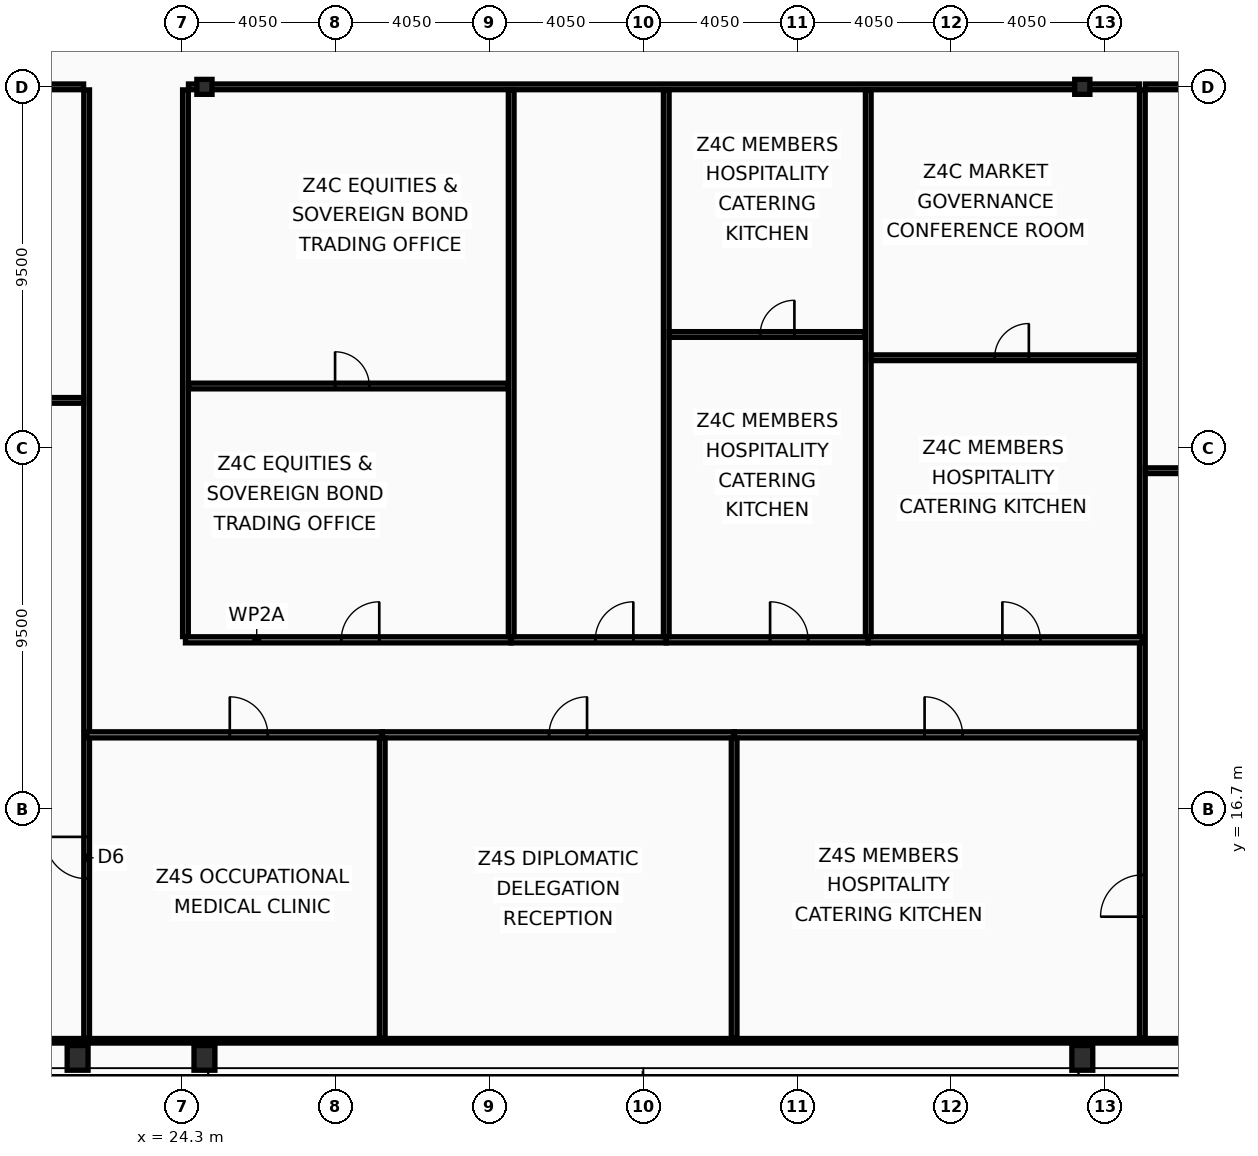
"""IFC4 building model, lengths in metres.
Left out: names, types, materials, properties, quantities, classifications, styles, units other than length and angle.
Written with IfcOpenShell. Run it as: python <this file> out.ifc"""

import sys

from ifc_helpers import new_model, si_unit, direction, frame, frame_2d, origin, origin_2d, place, context, subcontext, project, spatial, rectangle, hollow_rectangle, i_section, extrude, element, fill, save


model = new_model("IFC4")
c1 = context("Model", 3, precision=1e-05, world=origin(), true_north=direction((0.0, 1.0)))
c2 = subcontext(c1, "Body", "Model", "MODEL_VIEW")
j1 = project(units=[si_unit("LENGTHUNIT", "METRE"), si_unit("PLANEANGLEUNIT", "RADIAN")], contexts=[c1])
p1 = place(None, origin())
s1 = spatial("IfcSite", under=j1, at=p1, CompositionType="ELEMENT")
p2 = place(p1, origin())
s2 = spatial("IfcBuilding", under=s1, at=p2, CompositionType="ELEMENT")
p3 = place(p2, frame((0.0, 0.0, 325.4)))
s3 = spatial("IfcBuildingStorey", under=s2, at=p3, CompositionType="ELEMENT", Elevation=325.4)
for number, where, z_axis, x_axis in (
    (1, (21.562, 10.15, 0.0), (0.0, 0.0, 1.0), (1.0, 0.0, 0.0)),
    (2, (24.9, 10.15, 0.0), (0.0, 0.0, 1.0), (1.0, 0.0, 0.0)),
    (3, (48.0, 10.15, 0.0), (0.0, 0.0, 1.0), (1.0, 0.0, 0.0)),
):
    element("IfcColumn", number, at=place(p3, frame(where, z_axis=z_axis, x_axis=x_axis)), inside=s3, PredefinedType="COLUMN", context=c2, shape_type="SweptSolid", body=[
        extrude(hollow_rectangle(XDim=0.55, YDim=0.65, WallThickness=0.04, at=origin_2d()), origin(), (0.0, 0.0, 1.0), 3.6),
    ])
for number, where, z_axis, x_axis in (
    (4, (24.9, 35.7, 0.0), (0.0, 0.0, 1.0), (1.0, 0.0, 0.0)),
    (5, (48.0, 35.7, 0.0), (0.0, 0.0, 1.0), (1.0, 0.0, 0.0)),
):
    element("IfcColumn", number, at=place(p3, frame(where, z_axis=z_axis, x_axis=x_axis)), inside=s3, PredefinedType="COLUMN", context=c2, shape_type="SweptSolid", body=[
        extrude(i_section(OverallWidth=0.399, OverallDepth=0.393, WebThickness=0.023, FlangeThickness=0.037, at=origin_2d()), origin(), (0.0, 0.0, 1.0), 3.6),
    ])
p4 = place(p3, frame((21.8, 10.665, 0.0), z_axis=(0.0, 0.0, 1.0), x_axis=(0.0, 1.0, 0.0)))
e6 = element("IfcWall", 6, at=p4, inside=s3, PredefinedType="PARTITIONING", context=c2, shape_type="SweptSolid", body=[
    extrude(rectangle(XDim=24.955, YDim=0.15, at=frame_2d((12.478, 0.0))), origin(), (0.0, 0.0, 1.0), 3.07),
])
p5 = place(p4, frame((4.2, 0.0, 0.0)))
e7 = element("IfcOpeningElement", 7, at=p5, cuts=e6, PredefinedType="OPENING", context=c2, shape_type="SweptSolid", body=[
    extrude(rectangle(XDim=1.1, YDim=2.1, at=frame_2d((0.55, 1.05))), frame((0.0, 0.085, 0.0), z_axis=(0.0, -1.0, 0.0), x_axis=(1.0, 0.0, 0.0)), (0.0, 0.0, 1.0), 0.17),
])
p6 = place(p3, frame((12.095, 35.7, 0.0), z_axis=(0.0, 0.0, 1.0), x_axis=(1.0, 0.0, 0.0)))
e8 = element("IfcWall", 8, at=p6, inside=s3, PredefinedType="PARTITIONING", context=c2, shape_type="SweptSolid", body=[
    extrude(rectangle(XDim=9.625, YDim=0.15, at=frame_2d((4.812, 0.0))), origin(), (0.0, 0.0, 1.0), 2.83),
])
p7 = place(p6, frame((2.8, 0.0, 0.0)))
e9 = element("IfcOpeningElement", 9, at=p7, cuts=e8, PredefinedType="OPENING", context=c2, shape_type="SweptSolid", body=[
    extrude(rectangle(XDim=1.0, YDim=2.05, at=frame_2d((0.5, 1.025))), frame((0.0, 0.085, 0.0), z_axis=(0.0, -1.0, 0.0), x_axis=(1.0, 0.0, 0.0)), (0.0, 0.0, 1.0), 0.17),
])
p8 = place(p3, frame((12.095, 27.45, 0.0), z_axis=(0.0, 0.0, 1.0), x_axis=(1.0, 0.0, 0.0)))
e10 = element("IfcWall", 10, at=p8, inside=s3, PredefinedType="PARTITIONING", context=c2, shape_type="SweptSolid", body=[
    extrude(rectangle(XDim=9.625, YDim=0.15, at=frame_2d((4.812, 0.0))), origin(), (0.0, 0.0, 1.0), 2.83),
])
p9 = place(p8, frame((2.2, 0.0, 0.0)))
e11 = element("IfcOpeningElement", 11, at=p9, cuts=e10, PredefinedType="OPENING", context=c2, shape_type="SweptSolid", body=[
    extrude(rectangle(XDim=0.9, YDim=2.05, at=frame_2d((0.45, 1.025))), frame((0.0, 0.085, 0.0), z_axis=(0.0, -1.0, 0.0), x_axis=(1.0, 0.0, 0.0)), (0.0, 0.0, 1.0), 0.17),
])
p10 = place(p3, frame((24.4, 21.235, 0.0), z_axis=(0.0, 0.0, 1.0), x_axis=(0.0, 1.0, 0.0)))
e12 = element("IfcWall", 12, at=p10, inside=s3, PredefinedType="PARTITIONING", context=c2, shape_type="SweptSolid", body=[
    extrude(rectangle(XDim=14.385, YDim=0.15, at=frame_2d((7.192, 0.0))), origin(), (0.0, 0.0, 1.0), 2.83),
])
p11 = place(p3, frame((49.58, 10.665, 0.0), z_axis=(0.0, 0.0, 1.0), x_axis=(0.0, 1.0, 0.0)))
e13 = element("IfcWall", 13, at=p11, inside=s3, PredefinedType="PARTITIONING", context=c2, shape_type="SweptSolid", body=[
    extrude(rectangle(XDim=24.955, YDim=0.15, at=frame_2d((12.478, 0.0))), origin(), (0.0, 0.0, 1.0), 3.07),
])
p12 = place(p11, frame((3.2, 0.0, 0.0)))
e14 = element("IfcOpeningElement", 14, at=p12, cuts=e13, PredefinedType="OPENING", context=c2, shape_type="SweptSolid", body=[
    extrude(rectangle(XDim=1.1, YDim=2.1, at=frame_2d((0.55, 1.05))), frame((0.0, 0.085, 0.0), z_axis=(0.0, -1.0, 0.0), x_axis=(1.0, 0.0, 0.0)), (0.0, 0.0, 1.0), 0.17),
])
p13 = place(p3, frame((24.48, 35.7, 0.0), z_axis=(0.0, 0.0, 1.0), x_axis=(1.0, 0.0, 0.0)))
e15 = element("IfcWall", 15, at=p13, inside=s3, PredefinedType="PARTITIONING", context=c2, shape_type="SweptSolid", body=[
    extrude(rectangle(XDim=25.02, YDim=0.15, at=frame_2d((12.51, 0.0))), origin(), (0.0, 0.0, 1.0), 2.83),
])
p14 = place(p3, frame((49.66, 35.7, 0.0), z_axis=(0.0, 0.0, 1.0), x_axis=(1.0, 0.0, 0.0)))
e16 = element("IfcWall", 16, at=p14, inside=s3, PredefinedType="PARTITIONING", context=c2, shape_type="SweptSolid", body=[
    extrude(rectangle(XDim=11.145, YDim=0.15, at=frame_2d((5.573, 0.0))), origin(), (0.0, 0.0, 1.0), 2.83),
])
p15 = place(p14, frame((2.2, 0.0, 0.0)))
e17 = element("IfcOpeningElement", 17, at=p15, cuts=e16, PredefinedType="OPENING", context=c2, shape_type="SweptSolid", body=[
    extrude(rectangle(XDim=1.0, YDim=2.05, at=frame_2d((0.5, 1.025))), frame((0.0, 0.085, 0.0), z_axis=(0.0, -1.0, 0.0), x_axis=(1.0, 0.0, 0.0)), (0.0, 0.0, 1.0), 0.17),
])
p16 = place(p3, frame((49.66, 25.6, 0.0), z_axis=(0.0, 0.0, 1.0), x_axis=(1.0, 0.0, 0.0)))
e18 = element("IfcWall", 18, at=p16, inside=s3, PredefinedType="PARTITIONING", context=c2, shape_type="SweptSolid", body=[
    extrude(rectangle(XDim=11.145, YDim=0.15, at=frame_2d((5.573, 0.0))), origin(), (0.0, 0.0, 1.0), 2.83),
])
p17 = place(p16, frame((2.2, 0.0, 0.0)))
e19 = element("IfcOpeningElement", 19, at=p17, cuts=e18, PredefinedType="OPENING", context=c2, shape_type="SweptSolid", body=[
    extrude(rectangle(XDim=0.9, YDim=2.05, at=frame_2d((0.45, 1.025))), frame((0.0, 0.085, 0.0), z_axis=(0.0, -1.0, 0.0), x_axis=(1.0, 0.0, 0.0)), (0.0, 0.0, 1.0), 0.17),
])
p18 = place(p3, frame((24.4, 21.15, 0.0), z_axis=(0.0, 0.0, 1.0), x_axis=(1.0, 0.0, 0.0)))
e20 = element("IfcWall", 20, at=p18, inside=s3, PredefinedType="PARTITIONING", context=c2, shape_type="SweptSolid", body=[
    extrude(rectangle(XDim=8.572, YDim=0.16, at=frame_2d((4.286, 0.0))), origin(), (0.0, 0.0, 1.0), 2.83),
])
p19 = place(p18, frame((4.1, 0.0, 0.0)))
e21 = element("IfcOpeningElement", 21, at=p19, cuts=e20, PredefinedType="OPENING", context=c2, shape_type="SweptSolid", body=[
    extrude(rectangle(XDim=1.0, YDim=2.05, at=frame_2d((0.5, 1.025))), frame((0.0, 0.09, 0.0), z_axis=(0.0, -1.0, 0.0), x_axis=(1.0, 0.0, 0.0)), (0.0, 0.0, 1.0), 0.18),
])
p20 = place(p3, frame((24.48, 27.829, 0.0), z_axis=(0.0, 0.0, 1.0), x_axis=(1.0, 0.0, 0.0)))
e22 = element("IfcWall", 22, at=p20, inside=s3, PredefinedType="PARTITIONING", context=c2, shape_type="SweptSolid", body=[
    extrude(rectangle(XDim=8.412, YDim=0.15, at=frame_2d((4.206, 0.0))), origin(), (0.0, 0.0, 1.0), 2.83),
])
p21 = place(p20, frame((3.857, 0.0, 0.0)))
e23 = element("IfcOpeningElement", 23, at=p21, cuts=e22, PredefinedType="OPENING", context=c2, shape_type="SweptSolid", body=[
    extrude(rectangle(XDim=0.9, YDim=2.05, at=frame_2d((0.45, 1.025))), frame((0.0, 0.085, 0.0), z_axis=(0.0, -1.0, 0.0), x_axis=(1.0, 0.0, 0.0)), (0.0, 0.0, 1.0), 0.17),
])
p22 = place(p3, frame((32.972, 21.15, 0.0), z_axis=(0.0, 0.0, 1.0), x_axis=(1.0, 0.0, 0.0)))
e24 = element("IfcWall", 24, at=p22, inside=s3, PredefinedType="PARTITIONING", context=c2, shape_type="SweptSolid", body=[
    extrude(rectangle(XDim=4.08, YDim=0.16, at=frame_2d((2.04, 0.0))), origin(), (0.0, 0.0, 1.0), 3.44),
])
p23 = place(p22, frame((2.214, 0.0, 0.0)))
e25 = element("IfcOpeningElement", 25, at=p23, cuts=e24, PredefinedType="OPENING", context=c2, shape_type="SweptSolid", body=[
    extrude(rectangle(XDim=1.0, YDim=2.05, at=frame_2d((0.5, 1.025))), frame((0.0, 0.09, 0.0), z_axis=(0.0, -1.0, 0.0), x_axis=(1.0, 0.0, 0.0)), (0.0, 0.0, 1.0), 0.18),
])
p24 = place(p3, frame((32.972, 21.235, 0.0), z_axis=(0.0, 0.0, 1.0), x_axis=(0.0, 1.0, 0.0)))
e26 = element("IfcWall", 26, at=p24, inside=s3, PredefinedType="PARTITIONING", context=c2, shape_type="SweptSolid", body=[
    extrude(rectangle(XDim=14.385, YDim=0.15, at=frame_2d((7.192, 0.0))), origin(), (0.0, 0.0, 1.0), 3.07),
])
p25 = place(p3, frame((37.052, 21.15, 0.0), z_axis=(0.0, 0.0, 1.0), x_axis=(1.0, 0.0, 0.0)))
e27 = element("IfcWall", 27, at=p25, inside=s3, PredefinedType="PARTITIONING", context=c2, shape_type="SweptSolid", body=[
    extrude(rectangle(XDim=5.316, YDim=0.16, at=frame_2d((2.658, 0.0))), origin(), (0.0, 0.0, 1.0), 3.44),
])
p26 = place(p25, frame((2.733, 0.0, 0.0)))
e28 = element("IfcOpeningElement", 28, at=p26, cuts=e27, PredefinedType="OPENING", context=c2, shape_type="SweptSolid", body=[
    extrude(rectangle(XDim=1.0, YDim=2.05, at=frame_2d((0.5, 1.025))), frame((0.0, 0.09, 0.0), z_axis=(0.0, -1.0, 0.0), x_axis=(1.0, 0.0, 0.0)), (0.0, 0.0, 1.0), 0.18),
])
p27 = place(p3, frame((37.052, 21.235, 0.0), z_axis=(0.0, 0.0, 1.0), x_axis=(0.0, 1.0, 0.0)))
e29 = element("IfcWall", 29, at=p27, inside=s3, PredefinedType="PARTITIONING", context=c2, shape_type="SweptSolid", body=[
    extrude(rectangle(XDim=14.385, YDim=0.15, at=frame_2d((7.192, 0.0))), origin(), (0.0, 0.0, 1.0), 3.07),
])
p28 = place(p3, frame((37.132, 29.184, 0.0), z_axis=(0.0, 0.0, 1.0), x_axis=(1.0, 0.0, 0.0)))
e30 = element("IfcWall", 30, at=p28, inside=s3, PredefinedType="PARTITIONING", context=c2, shape_type="SweptSolid", body=[
    extrude(rectangle(XDim=5.156, YDim=0.15, at=frame_2d((2.578, 0.0))), origin(), (0.0, 0.0, 1.0), 3.07),
])
p29 = place(p28, frame((2.392, 0.0, 0.0)))
e31 = element("IfcOpeningElement", 31, at=p29, cuts=e30, PredefinedType="OPENING", context=c2, shape_type="SweptSolid", body=[
    extrude(rectangle(XDim=0.9, YDim=2.05, at=frame_2d((0.45, 1.025))), frame((0.0, 0.085, 0.0), z_axis=(0.0, -1.0, 0.0), x_axis=(1.0, 0.0, 0.0)), (0.0, 0.0, 1.0), 0.17),
])
p30 = place(p3, frame((42.368, 21.15, 0.0), z_axis=(0.0, 0.0, 1.0), x_axis=(1.0, 0.0, 0.0)))
e32 = element("IfcWall", 32, at=p30, inside=s3, PredefinedType="PARTITIONING", context=c2, shape_type="SweptSolid", body=[
    extrude(rectangle(XDim=7.212, YDim=0.16, at=frame_2d((3.606, 0.0))), origin(), (0.0, 0.0, 1.0), 2.83),
])
p31 = place(p30, frame((3.529, 0.0, 0.0)))
e33 = element("IfcOpeningElement", 33, at=p31, cuts=e32, PredefinedType="OPENING", context=c2, shape_type="SweptSolid", body=[
    extrude(rectangle(XDim=1.0, YDim=2.05, at=frame_2d((0.5, 1.025))), frame((0.0, 0.09, 0.0), z_axis=(0.0, -1.0, 0.0), x_axis=(1.0, 0.0, 0.0)), (0.0, 0.0, 1.0), 0.18),
])
p32 = place(p3, frame((42.368, 21.235, 0.0), z_axis=(0.0, 0.0, 1.0), x_axis=(0.0, 1.0, 0.0)))
e34 = element("IfcWall", 34, at=p32, inside=s3, PredefinedType="PARTITIONING", context=c2, shape_type="SweptSolid", body=[
    extrude(rectangle(XDim=14.385, YDim=0.15, at=frame_2d((7.192, 0.0))), origin(), (0.0, 0.0, 1.0), 3.07),
])
p33 = place(p3, frame((42.448, 28.572, 0.0), z_axis=(0.0, 0.0, 1.0), x_axis=(1.0, 0.0, 0.0)))
e35 = element("IfcWall", 35, at=p33, inside=s3, PredefinedType="PARTITIONING", context=c2, shape_type="SweptSolid", body=[
    extrude(rectangle(XDim=7.052, YDim=0.15, at=frame_2d((3.526, 0.0))), origin(), (0.0, 0.0, 1.0), 2.83),
])
p34 = place(p33, frame((3.245, 0.0, 0.0)))
e36 = element("IfcOpeningElement", 36, at=p34, cuts=e35, PredefinedType="OPENING", context=c2, shape_type="SweptSolid", body=[
    extrude(rectangle(XDim=0.9, YDim=2.05, at=frame_2d((0.45, 1.025))), frame((0.0, 0.085, 0.0), z_axis=(0.0, -1.0, 0.0), x_axis=(1.0, 0.0, 0.0)), (0.0, 0.0, 1.0), 0.17),
])
p35 = place(p3, frame((21.8, 18.65, 0.0), z_axis=(0.0, 0.0, 1.0), x_axis=(1.0, 0.0, 0.0)))
e37 = element("IfcWall", 37, at=p35, inside=s3, PredefinedType="PARTITIONING", context=c2, shape_type="SweptSolid", body=[
    extrude(rectangle(XDim=7.778, YDim=0.16, at=frame_2d((3.889, 0.0))), origin(), (0.0, 0.0, 1.0), 2.83),
])
p36 = place(p35, frame((3.767, 0.0, 0.0)))
e38 = element("IfcOpeningElement", 38, at=p36, cuts=e37, PredefinedType="OPENING", context=c2, shape_type="SweptSolid", body=[
    extrude(rectangle(XDim=1.0, YDim=2.05, at=frame_2d((0.5, 1.025))), frame((0.0, 0.09, 0.0), z_axis=(0.0, -1.0, 0.0), x_axis=(1.0, 0.0, 0.0)), (0.0, 0.0, 1.0), 0.18),
])
p37 = place(p3, frame((29.578, 18.65, 0.0), z_axis=(0.0, 0.0, 1.0), x_axis=(1.0, 0.0, 0.0)))
e39 = element("IfcWall", 39, at=p37, inside=s3, PredefinedType="PARTITIONING", context=c2, shape_type="SweptSolid", body=[
    extrude(rectangle(XDim=9.26, YDim=0.16, at=frame_2d((4.63, 0.0))), origin(), (0.0, 0.0, 1.0), 3.44),
])
p38 = place(p37, frame((4.389, 0.0, 0.0)))
e40 = element("IfcOpeningElement", 40, at=p38, cuts=e39, PredefinedType="OPENING", context=c2, shape_type="SweptSolid", body=[
    extrude(rectangle(XDim=1.0, YDim=2.05, at=frame_2d((0.5, 1.025))), frame((0.0, 0.09, 0.0), z_axis=(0.0, -1.0, 0.0), x_axis=(1.0, 0.0, 0.0)), (0.0, 0.0, 1.0), 0.18),
])
p39 = place(p3, frame((29.578, 10.665, 0.0), z_axis=(0.0, 0.0, 1.0), x_axis=(0.0, 1.0, 0.0)))
e41 = element("IfcWall", 41, at=p39, inside=s3, PredefinedType="PARTITIONING", context=c2, shape_type="SweptSolid", body=[
    extrude(rectangle(XDim=7.9, YDim=0.15, at=frame_2d((3.95, 0.0))), origin(), (0.0, 0.0, 1.0), 3.07),
])
p40 = place(p3, frame((38.838, 18.65, 0.0), z_axis=(0.0, 0.0, 1.0), x_axis=(1.0, 0.0, 0.0)))
e42 = element("IfcWall", 42, at=p40, inside=s3, PredefinedType="PARTITIONING", context=c2, shape_type="SweptSolid", body=[
    extrude(rectangle(XDim=10.742, YDim=0.16, at=frame_2d((5.371, 0.0))), origin(), (0.0, 0.0, 1.0), 2.83),
])
p41 = place(p40, frame((5.011, 0.0, 0.0)))
e43 = element("IfcOpeningElement", 43, at=p41, cuts=e42, PredefinedType="OPENING", context=c2, shape_type="SweptSolid", body=[
    extrude(rectangle(XDim=1.0, YDim=2.05, at=frame_2d((0.5, 1.025))), frame((0.0, 0.09, 0.0), z_axis=(0.0, -1.0, 0.0), x_axis=(1.0, 0.0, 0.0)), (0.0, 0.0, 1.0), 0.18),
])
p42 = place(p3, frame((38.838, 10.665, 0.0), z_axis=(0.0, 0.0, 1.0), x_axis=(0.0, 1.0, 0.0)))
e44 = element("IfcWall", 44, at=p42, inside=s3, PredefinedType="PARTITIONING", context=c2, shape_type="SweptSolid", body=[
    extrude(rectangle(XDim=7.9, YDim=0.15, at=frame_2d((3.95, 0.0))), origin(), (0.0, 0.0, 1.0), 3.07),
])
p43 = place(p3, frame((12.095, 10.6, 0.0), z_axis=(0.0, 0.0, 1.0), x_axis=(1.0, 0.0, 0.0)))
e45 = element("IfcWall", 45, at=p43, inside=s3, PredefinedType="PARTITIONING", context=c2, shape_type="SweptSolid", body=[
    extrude(rectangle(XDim=48.71, YDim=0.12, at=frame_2d((24.355, 0.0))), origin(), (0.0, 0.0, 1.0), 2.83),
])
p44 = place(p5, origin())
e46 = element("IfcDoor", 46, at=p44, inside=s3, OperationType="SINGLE_SWING_RIGHT", PredefinedType="DOOR", context=c2, shape_type="SweptSolid", body=[
    extrude(rectangle(XDim=1.1, YDim=2.1, at=frame_2d((0.55, 1.05))), frame((0.0, 0.025, 0.0), z_axis=(0.0, -1.0, 0.0), x_axis=(1.0, 0.0, 0.0)), (0.0, 0.0, 1.0), 0.05),
])
fill(e7, e46)
p45 = place(p12, origin())
e47 = element("IfcDoor", 47, at=p45, inside=s3, OperationType="SINGLE_SWING_LEFT", PredefinedType="DOOR", context=c2, shape_type="SweptSolid", body=[
    extrude(rectangle(XDim=1.1, YDim=2.1, at=frame_2d((0.55, 1.05))), frame((0.0, 0.025, 0.0), z_axis=(0.0, -1.0, 0.0), x_axis=(1.0, 0.0, 0.0)), (0.0, 0.0, 1.0), 0.05),
])
fill(e14, e47)
p46 = place(p19, origin())
e48 = element("IfcDoor", 48, at=p46, inside=s3, OperationType="SINGLE_SWING_RIGHT", PredefinedType="DOOR", context=c2, shape_type="SweptSolid", body=[
    extrude(rectangle(XDim=1.0, YDim=2.05, at=frame_2d((0.5, 1.025))), frame((0.0, 0.025, 0.0), z_axis=(0.0, -1.0, 0.0), x_axis=(1.0, 0.0, 0.0)), (0.0, 0.0, 1.0), 0.05),
])
fill(e21, e48)
p47 = place(p21, origin())
e49 = element("IfcDoor", 49, at=p47, inside=s3, OperationType="SINGLE_SWING_LEFT", PredefinedType="DOOR", context=c2, shape_type="SweptSolid", body=[
    extrude(rectangle(XDim=0.9, YDim=2.05, at=frame_2d((0.45, 1.025))), frame((0.0, 0.025, 0.0), z_axis=(0.0, -1.0, 0.0), x_axis=(1.0, 0.0, 0.0)), (0.0, 0.0, 1.0), 0.05),
])
fill(e23, e49)
p48 = place(p23, origin())
e50 = element("IfcDoor", 50, at=p48, inside=s3, OperationType="SINGLE_SWING_RIGHT", PredefinedType="DOOR", context=c2, shape_type="SweptSolid", body=[
    extrude(rectangle(XDim=1.0, YDim=2.05, at=frame_2d((0.5, 1.025))), frame((0.0, 0.025, 0.0), z_axis=(0.0, -1.0, 0.0), x_axis=(1.0, 0.0, 0.0)), (0.0, 0.0, 1.0), 0.05),
])
fill(e25, e50)
p49 = place(p26, origin())
e51 = element("IfcDoor", 51, at=p49, inside=s3, OperationType="SINGLE_SWING_LEFT", PredefinedType="DOOR", context=c2, shape_type="SweptSolid", body=[
    extrude(rectangle(XDim=1.0, YDim=2.05, at=frame_2d((0.5, 1.025))), frame((0.0, 0.025, 0.0), z_axis=(0.0, -1.0, 0.0), x_axis=(1.0, 0.0, 0.0)), (0.0, 0.0, 1.0), 0.05),
])
fill(e28, e51)
p50 = place(p29, origin())
e52 = element("IfcDoor", 52, at=p50, inside=s3, OperationType="SINGLE_SWING_RIGHT", PredefinedType="DOOR", context=c2, shape_type="SweptSolid", body=[
    extrude(rectangle(XDim=0.9, YDim=2.05, at=frame_2d((0.45, 1.025))), frame((0.0, 0.025, 0.0), z_axis=(0.0, -1.0, 0.0), x_axis=(1.0, 0.0, 0.0)), (0.0, 0.0, 1.0), 0.05),
])
fill(e31, e52)
p51 = place(p31, origin())
e53 = element("IfcDoor", 53, at=p51, inside=s3, OperationType="SINGLE_SWING_LEFT", PredefinedType="DOOR", context=c2, shape_type="SweptSolid", body=[
    extrude(rectangle(XDim=1.0, YDim=2.05, at=frame_2d((0.5, 1.025))), frame((0.0, 0.025, 0.0), z_axis=(0.0, -1.0, 0.0), x_axis=(1.0, 0.0, 0.0)), (0.0, 0.0, 1.0), 0.05),
])
fill(e33, e53)
p52 = place(p34, origin())
e54 = element("IfcDoor", 54, at=p52, inside=s3, OperationType="SINGLE_SWING_RIGHT", PredefinedType="DOOR", context=c2, shape_type="SweptSolid", body=[
    extrude(rectangle(XDim=0.9, YDim=2.05, at=frame_2d((0.45, 1.025))), frame((0.0, 0.025, 0.0), z_axis=(0.0, -1.0, 0.0), x_axis=(1.0, 0.0, 0.0)), (0.0, 0.0, 1.0), 0.05),
])
fill(e36, e54)
p53 = place(p36, origin())
e55 = element("IfcDoor", 55, at=p53, inside=s3, OperationType="SINGLE_SWING_LEFT", PredefinedType="DOOR", context=c2, shape_type="SweptSolid", body=[
    extrude(rectangle(XDim=1.0, YDim=2.05, at=frame_2d((0.5, 1.025))), frame((0.0, 0.025, 0.0), z_axis=(0.0, -1.0, 0.0), x_axis=(1.0, 0.0, 0.0)), (0.0, 0.0, 1.0), 0.05),
])
fill(e38, e55)
p54 = place(p38, origin())
e56 = element("IfcDoor", 56, at=p54, inside=s3, OperationType="SINGLE_SWING_RIGHT", PredefinedType="DOOR", context=c2, shape_type="SweptSolid", body=[
    extrude(rectangle(XDim=1.0, YDim=2.05, at=frame_2d((0.5, 1.025))), frame((0.0, 0.025, 0.0), z_axis=(0.0, -1.0, 0.0), x_axis=(1.0, 0.0, 0.0)), (0.0, 0.0, 1.0), 0.05),
])
fill(e40, e56)
p55 = place(p41, origin())
e57 = element("IfcDoor", 57, at=p55, inside=s3, OperationType="SINGLE_SWING_LEFT", PredefinedType="DOOR", context=c2, shape_type="SweptSolid", body=[
    extrude(rectangle(XDim=1.0, YDim=2.05, at=frame_2d((0.5, 1.025))), frame((0.0, 0.025, 0.0), z_axis=(0.0, -1.0, 0.0), x_axis=(1.0, 0.0, 0.0)), (0.0, 0.0, 1.0), 0.05),
])
fill(e43, e57)
save(model, sys.argv[1])
